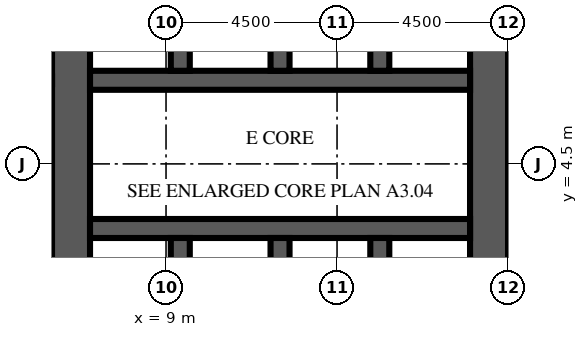
"""IFC4 building model, lengths in metres.
Left out: names, types, materials, properties, quantities, classifications, styles, units other than length and angle.
Written with IfcOpenShell. Run it as: python <this file> out.ifc"""

import sys

from ifc_helpers import new_model, si_unit, direction, frame, frame_2d, origin, place, context, subcontext, project, spatial, rectangle, extrude, element, fill, save


model = new_model("IFC4")
c1 = context("Model", 3, precision=1e-05, world=origin(), true_north=direction((0.0, 1.0)))
c2 = subcontext(c1, "Body", "Model", "MODEL_VIEW")
j1 = project(units=[si_unit("LENGTHUNIT", "METRE"), si_unit("PLANEANGLEUNIT", "RADIAN")], contexts=[c1])
p1 = place(None, origin())
s1 = spatial("IfcSite", under=j1, at=p1, CompositionType="ELEMENT")
p2 = place(p1, origin())
s2 = spatial("IfcBuilding", under=s1, at=p2, CompositionType="ELEMENT")
p3 = place(p2, frame((0.0, 0.0, 11.3)))
s3 = spatial("IfcBuildingStorey", under=s2, at=p3, CompositionType="ELEMENT", Elevation=11.3)
p4 = place(p3, frame((6.5, -9.0, 0.0), z_axis=(0.0, 0.0, 1.0), x_axis=(0.0, 1.0, 0.0)))
e1 = element("IfcWall", 1, at=p4, inside=s3, PredefinedType="SHEAR", context=c2, shape_type="SweptSolid", body=[
    extrude(rectangle(XDim=27.5, YDim=1.0, at=frame_2d((13.75, 0.0))), origin(), (0.0, 0.0, 1.0), 4.1),
])
p5 = place(p4, frame((12.55, 0.0, 0.0)))
e2 = element("IfcOpeningElement", 2, at=p5, cuts=e1, PredefinedType="OPENING", context=c2, shape_type="SweptSolid", body=[
    extrude(rectangle(XDim=2.4, YDim=2.4, at=frame_2d((1.2, 1.2))), frame((0.0, 0.51, 0.0), z_axis=(0.0, -1.0, 0.0), x_axis=(1.0, 0.0, 0.0)), (0.0, 0.0, 1.0), 1.02),
])
p6 = place(p4, frame((4.025, 0.0, 0.0)))
e3 = element("IfcOpeningElement", 3, at=p6, cuts=e1, PredefinedType="OPENING", context=c2, shape_type="SweptSolid", body=[
    extrude(rectangle(XDim=1.2, YDim=2.1, at=frame_2d((0.6, 1.05))), frame((0.0, 0.51, 0.0), z_axis=(0.0, -1.0, 0.0), x_axis=(1.0, 0.0, 0.0)), (0.0, 0.0, 1.0), 1.02),
])
p7 = place(p4, frame((22.275, 0.0, 0.0)))
e4 = element("IfcOpeningElement", 4, at=p7, cuts=e1, PredefinedType="OPENING", context=c2, shape_type="SweptSolid", body=[
    extrude(rectangle(XDim=1.2, YDim=2.1, at=frame_2d((0.6, 1.05))), frame((0.0, 0.51, 0.0), z_axis=(0.0, -1.0, 0.0), x_axis=(1.0, 0.0, 0.0)), (0.0, 0.0, 1.0), 1.02),
])
p8 = place(p3, frame((17.5, -9.0, 0.0), z_axis=(0.0, 0.0, 1.0), x_axis=(0.0, 1.0, 0.0)))
e5 = element("IfcWall", 5, at=p8, inside=s3, PredefinedType="SHEAR", context=c2, shape_type="SweptSolid", body=[
    extrude(rectangle(XDim=27.5, YDim=1.0, at=frame_2d((13.75, 0.0))), origin(), (0.0, 0.0, 1.0), 4.1),
])
p9 = place(p8, frame((12.55, 0.0, 0.0)))
e6 = element("IfcOpeningElement", 6, at=p9, cuts=e5, PredefinedType="OPENING", context=c2, shape_type="SweptSolid", body=[
    extrude(rectangle(XDim=2.4, YDim=2.4, at=frame_2d((1.2, 1.2))), frame((0.0, 0.51, 0.0), z_axis=(0.0, -1.0, 0.0), x_axis=(1.0, 0.0, 0.0)), (0.0, 0.0, 1.0), 1.02),
])
p10 = place(p8, frame((6.825, 0.0, 0.0)))
e7 = element("IfcOpeningElement", 7, at=p10, cuts=e5, PredefinedType="OPENING", context=c2, shape_type="SweptSolid", body=[
    extrude(rectangle(XDim=1.2, YDim=2.1, at=frame_2d((0.6, 1.05))), frame((0.0, 0.51, 0.0), z_axis=(0.0, -1.0, 0.0), x_axis=(1.0, 0.0, 0.0)), (0.0, 0.0, 1.0), 1.02),
])
p11 = place(p8, frame((19.475, 0.0, 0.0)))
e8 = element("IfcOpeningElement", 8, at=p11, cuts=e5, PredefinedType="OPENING", context=c2, shape_type="SweptSolid", body=[
    extrude(rectangle(XDim=1.2, YDim=2.1, at=frame_2d((0.6, 1.05))), frame((0.0, 0.51, 0.0), z_axis=(0.0, -1.0, 0.0), x_axis=(1.0, 0.0, 0.0)), (0.0, 0.0, 1.0), 1.02),
])
p12 = place(p3, frame((7.0, 2.8, 0.0), z_axis=(0.0, 0.0, 1.0), x_axis=(1.0, 0.0, 0.0)))
e9 = element("IfcWall", 9, at=p12, inside=s3, PredefinedType="SHEAR", context=c2, shape_type="SweptSolid", body=[
    extrude(rectangle(XDim=10.0, YDim=0.5, at=frame_2d((5.0, 0.0))), origin(), (0.0, 0.0, 1.0), 4.1),
])
p13 = place(p12, frame((0.512, 0.0, 0.0)))
e10 = element("IfcOpeningElement", 10, at=p13, cuts=e9, PredefinedType="OPENING", context=c2, shape_type="SweptSolid", body=[
    extrude(rectangle(XDim=1.1, YDim=2.1, at=frame_2d((0.55, 1.05))), frame((0.0, 0.26, 0.0), z_axis=(0.0, -1.0, 0.0), x_axis=(1.0, 0.0, 0.0)), (0.0, 0.0, 1.0), 0.52),
])
p14 = place(p12, frame((3.137, 0.0, 0.0)))
e11 = element("IfcOpeningElement", 11, at=p14, cuts=e9, PredefinedType="OPENING", context=c2, shape_type="SweptSolid", body=[
    extrude(rectangle(XDim=1.1, YDim=2.1, at=frame_2d((0.55, 1.05))), frame((0.0, 0.26, 0.0), z_axis=(0.0, -1.0, 0.0), x_axis=(1.0, 0.0, 0.0)), (0.0, 0.0, 1.0), 0.52),
])
p15 = place(p12, frame((8.387, 0.0, 0.0)))
e12 = element("IfcOpeningElement", 12, at=p15, cuts=e9, PredefinedType="OPENING", context=c2, shape_type="SweptSolid", body=[
    extrude(rectangle(XDim=1.1, YDim=2.1, at=frame_2d((0.55, 1.05))), frame((0.0, 0.26, 0.0), z_axis=(0.0, -1.0, 0.0), x_axis=(1.0, 0.0, 0.0)), (0.0, 0.0, 1.0), 0.52),
])
p16 = place(p3, frame((7.0, 6.7, 0.0), z_axis=(0.0, 0.0, 1.0), x_axis=(1.0, 0.0, 0.0)))
e13 = element("IfcWall", 13, at=p16, inside=s3, PredefinedType="SHEAR", context=c2, shape_type="SweptSolid", body=[
    extrude(rectangle(XDim=10.0, YDim=0.5, at=frame_2d((5.0, 0.0))), origin(), (0.0, 0.0, 1.0), 4.1),
])
p17 = place(p16, frame((0.512, 0.0, 0.0)))
e14 = element("IfcOpeningElement", 14, at=p17, cuts=e13, PredefinedType="OPENING", context=c2, shape_type="SweptSolid", body=[
    extrude(rectangle(XDim=1.1, YDim=2.1, at=frame_2d((0.55, 1.05))), frame((0.0, 0.26, 0.0), z_axis=(0.0, -1.0, 0.0), x_axis=(1.0, 0.0, 0.0)), (0.0, 0.0, 1.0), 0.52),
])
p18 = place(p16, frame((3.188, 0.0, 0.0)))
e15 = element("IfcOpeningElement", 15, at=p18, cuts=e13, PredefinedType="OPENING", context=c2, shape_type="SweptSolid", body=[
    extrude(rectangle(XDim=1.0, YDim=2.1, at=frame_2d((0.5, 1.05))), frame((0.0, 0.26, 0.0), z_axis=(0.0, -1.0, 0.0), x_axis=(1.0, 0.0, 0.0)), (0.0, 0.0, 1.0), 0.52),
])
p19 = place(p16, frame((5.812, 0.0, 0.0)))
e16 = element("IfcOpeningElement", 16, at=p19, cuts=e13, PredefinedType="OPENING", context=c2, shape_type="SweptSolid", body=[
    extrude(rectangle(XDim=1.0, YDim=2.1, at=frame_2d((0.5, 1.05))), frame((0.0, 0.26, 0.0), z_axis=(0.0, -1.0, 0.0), x_axis=(1.0, 0.0, 0.0)), (0.0, 0.0, 1.0), 0.52),
])
p20 = place(p16, frame((8.438, 0.0, 0.0)))
e17 = element("IfcOpeningElement", 17, at=p20, cuts=e13, PredefinedType="OPENING", context=c2, shape_type="SweptSolid", body=[
    extrude(rectangle(XDim=1.0, YDim=2.1, at=frame_2d((0.5, 1.05))), frame((0.0, 0.26, 0.0), z_axis=(0.0, -1.0, 0.0), x_axis=(1.0, 0.0, 0.0)), (0.0, 0.0, 1.0), 0.52),
])
for number, where, z_axis, x_axis in (
    (18, (9.375, -0.25, 0.0), (0.0, 0.0, 1.0), (0.0, 1.0, 0.0)),
    (19, (9.375, 6.95, 0.0), (0.0, 0.0, 1.0), (0.0, 1.0, 0.0)),
    (20, (12.0, -0.25, 0.0), (0.0, 0.0, 1.0), (0.0, 1.0, 0.0)),
    (21, (12.0, 6.95, 0.0), (0.0, 0.0, 1.0), (0.0, 1.0, 0.0)),
    (22, (14.625, -0.25, 0.0), (0.0, 0.0, 1.0), (0.0, 1.0, 0.0)),
    (23, (14.625, 6.95, 0.0), (0.0, 0.0, 1.0), (0.0, 1.0, 0.0)),
):
    element("IfcWall", number, at=place(p3, frame(where, z_axis=z_axis, x_axis=x_axis)), inside=s3, PredefinedType="SHEAR", context=c2, shape_type="SweptSolid", body=[
        extrude(rectangle(XDim=2.8, YDim=0.5, at=frame_2d((1.4, 0.0))), origin(), (0.0, 0.0, 1.0), 4.1),
    ])
p21 = place(p13, origin())
e24 = element("IfcDoor", 24, at=p21, inside=s3, OperationType="DOUBLE_DOOR_SLIDING", PredefinedType="DOOR", context=c2, shape_type="SweptSolid", body=[
    extrude(rectangle(XDim=1.1, YDim=2.1, at=frame_2d((0.55, 1.05))), frame((0.0, 0.025, 0.0), z_axis=(0.0, -1.0, 0.0), x_axis=(1.0, 0.0, 0.0)), (0.0, 0.0, 1.0), 0.05),
])
fill(e10, e24)
p22 = place(p14, origin())
e25 = element("IfcDoor", 25, at=p22, inside=s3, OperationType="DOUBLE_DOOR_SLIDING", PredefinedType="DOOR", context=c2, shape_type="SweptSolid", body=[
    extrude(rectangle(XDim=1.1, YDim=2.1, at=frame_2d((0.55, 1.05))), frame((0.0, 0.025, 0.0), z_axis=(0.0, -1.0, 0.0), x_axis=(1.0, 0.0, 0.0)), (0.0, 0.0, 1.0), 0.05),
])
fill(e11, e25)
p23 = place(p15, origin())
e26 = element("IfcDoor", 26, at=p23, inside=s3, OperationType="DOUBLE_DOOR_SLIDING", PredefinedType="DOOR", context=c2, shape_type="SweptSolid", body=[
    extrude(rectangle(XDim=1.1, YDim=2.1, at=frame_2d((0.55, 1.05))), frame((0.0, 0.025, 0.0), z_axis=(0.0, -1.0, 0.0), x_axis=(1.0, 0.0, 0.0)), (0.0, 0.0, 1.0), 0.05),
])
fill(e12, e26)
p24 = place(p17, origin())
e27 = element("IfcDoor", 27, at=p24, inside=s3, OperationType="DOUBLE_DOOR_SLIDING", PredefinedType="DOOR", context=c2, shape_type="SweptSolid", body=[
    extrude(rectangle(XDim=1.1, YDim=2.1, at=frame_2d((0.55, 1.05))), frame((0.0, 0.025, 0.0), z_axis=(0.0, -1.0, 0.0), x_axis=(1.0, 0.0, 0.0)), (0.0, 0.0, 1.0), 0.05),
])
fill(e14, e27)
p25 = place(p5, origin())
e28 = element("IfcDoor", 28, at=p25, inside=s3, OperationType="DOUBLE_DOOR_DOUBLE_SWING", PredefinedType="DOOR", context=c2, shape_type="SweptSolid", body=[
    extrude(rectangle(XDim=2.4, YDim=2.4, at=frame_2d((1.2, 1.2))), frame((0.0, 0.025, 0.0), z_axis=(0.0, -1.0, 0.0), x_axis=(1.0, 0.0, 0.0)), (0.0, 0.0, 1.0), 0.05),
])
fill(e2, e28)
p26 = place(p9, origin())
e29 = element("IfcDoor", 29, at=p26, inside=s3, OperationType="DOUBLE_DOOR_DOUBLE_SWING", PredefinedType="DOOR", context=c2, shape_type="SweptSolid", body=[
    extrude(rectangle(XDim=2.4, YDim=2.4, at=frame_2d((1.2, 1.2))), frame((0.0, 0.025, 0.0), z_axis=(0.0, -1.0, 0.0), x_axis=(1.0, 0.0, 0.0)), (0.0, 0.0, 1.0), 0.05),
])
fill(e6, e29)
p27 = place(p18, origin())
e30 = element("IfcDoor", 30, at=p27, inside=s3, OperationType="SINGLE_SWING_RIGHT", PredefinedType="DOOR", context=c2, shape_type="SweptSolid", body=[
    extrude(rectangle(XDim=1.0, YDim=2.1, at=frame_2d((0.5, 1.05))), frame((0.0, 0.025, 0.0), z_axis=(0.0, -1.0, 0.0), x_axis=(1.0, 0.0, 0.0)), (0.0, 0.0, 1.0), 0.05),
])
fill(e15, e30)
p28 = place(p19, origin())
e31 = element("IfcDoor", 31, at=p28, inside=s3, OperationType="SINGLE_SWING_LEFT", PredefinedType="DOOR", context=c2, shape_type="SweptSolid", body=[
    extrude(rectangle(XDim=1.0, YDim=2.1, at=frame_2d((0.5, 1.05))), frame((0.0, 0.025, 0.0), z_axis=(0.0, -1.0, 0.0), x_axis=(1.0, 0.0, 0.0)), (0.0, 0.0, 1.0), 0.05),
])
fill(e16, e31)
p29 = place(p20, origin())
e32 = element("IfcDoor", 32, at=p29, inside=s3, OperationType="SINGLE_SWING_RIGHT", PredefinedType="DOOR", context=c2, shape_type="SweptSolid", body=[
    extrude(rectangle(XDim=1.0, YDim=2.1, at=frame_2d((0.5, 1.05))), frame((0.0, 0.025, 0.0), z_axis=(0.0, -1.0, 0.0), x_axis=(1.0, 0.0, 0.0)), (0.0, 0.0, 1.0), 0.05),
])
fill(e17, e32)
save(model, sys.argv[1])
